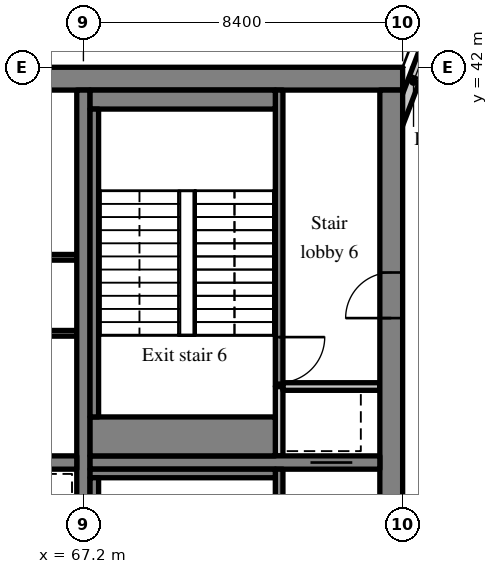
"""IFC4 building model, lengths in metres.
Left out: names, types, materials, properties, quantities, classifications, styles, units other than length and angle.
Written with IfcOpenShell. Run it as: python <this file> out.ifc"""

import sys

from ifc_helpers import new_model, si_unit, direction, frame, frame_2d, origin, place, context, subcontext, project, spatial, rectangle, extrude, source, transform, mapped, element, fill, save


model = new_model("IFC4")
c1 = context("Model", 3, precision=1e-05, world=origin(), true_north=direction((0.0, 1.0)))
c2 = subcontext(c1, "Body", "Model", "MODEL_VIEW")
j1 = project(units=[si_unit("LENGTHUNIT", "METRE"), si_unit("PLANEANGLEUNIT", "RADIAN")], contexts=[c1])
p1 = place(None, origin())
s1 = spatial("IfcSite", under=j1, at=p1, CompositionType="ELEMENT")
p2 = place(p1, origin())
s2 = spatial("IfcBuilding", under=s1, at=p2, CompositionType="ELEMENT")
p3 = place(p2, frame((0.0, 0.0, 245.2)))
s3 = spatial("IfcBuildingStorey", under=s2, at=p3, CompositionType="ELEMENT", Elevation=245.2)
m1 = source(origin(), c2, "Body", "SweptSolid", [
    extrude(rectangle(XDim=50.4, YDim=0.6, at=frame_2d((25.2, 0.0))), origin(), (0.0, 0.0, 1.0), 3.62),
])
p4 = place(p3, frame((25.2, 41.7, 0.0), z_axis=(0.0, 0.0, 1.0), x_axis=(1.0, 0.0, 0.0)))
e1 = element("IfcWall", 1, at=p4, inside=s3, PredefinedType="SHEAR", context=c2, shape_type="MappedRepresentation", body=[
    mapped(m1, transform((0.0, 0.0, 0.0), scale=1.0)),
])
m2 = source(origin(), c2, "Body", "SweptSolid", [
    extrude(rectangle(XDim=18.8, YDim=0.6, at=frame_2d((9.4, 0.0))), origin(), (0.0, 0.0, 1.0), 3.62),
])
p5 = place(p3, frame((75.3, 22.6, 0.0), z_axis=(0.0, 0.0, 1.0), x_axis=(0.0, 1.0, 0.0)))
e2 = element("IfcWall", 2, at=p5, inside=s3, PredefinedType="SHEAR", context=c2, shape_type="MappedRepresentation", body=[
    mapped(m2, transform((0.0, 0.0, 0.0), scale=1.0)),
])
m3 = source(origin(), c2, "Body", "SweptSolid", [
    extrude(rectangle(XDim=1.2, YDim=2.1, at=frame_2d((0.6, 1.05))), frame((0.0, 0.31, 0.0), z_axis=(0.0, -1.0, 0.0), x_axis=(1.0, 0.0, 0.0)), (0.0, 0.0, 1.0), 0.62),
])
p6 = place(p5, frame((12.8, 0.0, 0.0)))
e3 = element("IfcOpeningElement", 3, at=p6, cuts=e2, PredefinedType="OPENING", context=c2, shape_type="MappedRepresentation", body=[
    mapped(m3, transform((0.0, 0.0, 0.0), scale=1.0)),
])
m4 = source(origin(), c2, "Body", "SweptSolid", [
    extrude(rectangle(XDim=18.8, YDim=0.35, at=frame_2d((9.4, 0.0))), origin(), (0.0, 0.0, 1.0), 3.62),
])
p7 = place(p3, frame((67.2, 22.6, 0.0), z_axis=(0.0, 0.0, 1.0), x_axis=(0.0, 1.0, 0.0)))
e4 = element("IfcWall", 4, at=p7, inside=s3, PredefinedType="SHEAR", context=c2, shape_type="MappedRepresentation", body=[
    mapped(m4, transform((0.0, 0.0, 0.0), scale=1.0)),
])
m5 = source(origin(), c2, "Body", "SweptSolid", [
    extrude(rectangle(XDim=16.45, YDim=0.35, at=frame_2d((8.225, 0.0))), origin(), (0.0, 0.0, 1.0), 3.62),
])
p8 = place(p3, frame((50.575, 31.6, 0.0), z_axis=(0.0, 0.0, 1.0), x_axis=(1.0, 0.0, 0.0)))
e5 = element("IfcWall", 5, at=p8, inside=s3, PredefinedType="SHEAR", context=c2, shape_type="MappedRepresentation", body=[
    mapped(m5, transform((0.0, 0.0, 0.0), scale=1.0)),
])
m6 = source(origin(), c2, "Body", "SweptSolid", [
    extrude(rectangle(XDim=1.0, YDim=2.1, at=frame_2d((0.5, 1.05))), frame((0.0, 0.185, 0.0), z_axis=(0.0, -1.0, 0.0), x_axis=(1.0, 0.0, 0.0)), (0.0, 0.0, 1.0), 0.37),
])
p9 = place(p8, frame((0.613, 0.0, 0.0)))
e6 = element("IfcOpeningElement", 6, at=p9, cuts=e5, PredefinedType="OPENING", context=c2, shape_type="MappedRepresentation", body=[
    mapped(m6, transform((0.0, 0.0, 0.0), scale=1.0)),
])
m7 = source(origin(), c2, "Body", "SweptSolid", [
    extrude(rectangle(XDim=7.625, YDim=0.35, at=frame_2d((3.812, 0.0))), origin(), (0.0, 0.0, 1.0), 3.62),
])
p10 = place(p3, frame((67.375, 31.6, 0.0), z_axis=(0.0, 0.0, 1.0), x_axis=(1.0, 0.0, 0.0)))
e7 = element("IfcWall", 7, at=p10, inside=s3, PredefinedType="SHEAR", context=c2, shape_type="MappedRepresentation", body=[
    mapped(m7, transform((0.0, 0.0, 0.0), scale=1.0)),
])
m8 = source(origin(), c2, "Body", "SweptSolid", [
    extrude(rectangle(XDim=1.1, YDim=2.1, at=frame_2d((0.55, 1.05))), frame((0.0, 0.185, 0.0), z_axis=(0.0, -1.0, 0.0), x_axis=(1.0, 0.0, 0.0)), (0.0, 0.0, 1.0), 0.37),
])
p11 = place(p10, frame((5.8, 0.0, 0.0)))
e8 = element("IfcOpeningElement", 8, at=p11, cuts=e7, PredefinedType="OPENING", context=c2, shape_type="MappedRepresentation", body=[
    mapped(m8, transform((0.0, 0.0, 0.0), scale=1.0)),
])
m9 = source(origin(), c2, "Body", "SweptSolid", [
    extrude(rectangle(XDim=3.559, YDim=0.3, at=frame_2d((1.78, 0.0))), origin(), (0.0, 0.0, 1.0), 3.62),
])
p12 = place(p3, frame((76.523, 43.292, 0.0), z_axis=(0.0, 0.0, 1.0), x_axis=(-0.35779745313, -0.933799219604, 0.0)))
e9 = element("IfcWall", 9, at=p12, inside=s3, PredefinedType="SOLIDWALL", context=c2, shape_type="MappedRepresentation", body=[
    mapped(m9, transform((0.0, 0.0, 0.0), scale=1.0)),
])
m10 = source(origin(), c2, "Body", "SweptSolid", [
    extrude(rectangle(XDim=1.5, YDim=2.0, at=frame_2d((0.75, 1.0))), frame((0.0, 0.16, 0.0), z_axis=(0.0, -1.0, 0.0), x_axis=(1.0, 0.0, 0.0)), (0.0, 0.0, 1.0), 0.32),
])
p13 = place(p12, frame((0.156, 0.0, 0.9)))
e10 = element("IfcOpeningElement", 10, at=p13, cuts=e9, PredefinedType="OPENING", context=c2, shape_type="MappedRepresentation", body=[
    mapped(m10, transform((0.0, 0.0, 0.0), scale=1.0)),
])
m11 = source(origin(), c2, "Body", "SweptSolid", [
    extrude(rectangle(XDim=14.225, YDim=0.15, at=frame_2d((7.112, 0.0))), origin(), (0.0, 0.0, 1.0), 3.62),
])
p14 = place(p3, frame((67.025, 35.0, 0.0), z_axis=(0.0, 0.0, 1.0), x_axis=(-1.0, 0.0, 0.0)))
e11 = element("IfcWall", 11, at=p14, inside=s3, PredefinedType="PARTITIONING", context=c2, shape_type="MappedRepresentation", body=[
    mapped(m11, transform((0.0, 0.0, 0.0), scale=1.0)),
])
m12 = source(origin(), c2, "Body", "SweptSolid", [
    extrude(rectangle(XDim=0.9, YDim=2.1, at=frame_2d((0.45, 1.05))), frame((0.0, 0.085, 0.0), z_axis=(0.0, -1.0, 0.0), x_axis=(1.0, 0.0, 0.0)), (0.0, 0.0, 1.0), 0.17),
])
p15 = place(p14, frame((2.026, 0.0, 0.0)))
e12 = element("IfcOpeningElement", 12, at=p15, cuts=e11, PredefinedType="OPENING", context=c2, shape_type="MappedRepresentation", body=[
    mapped(m12, transform((0.0, 0.0, 0.0), scale=1.0)),
])
p16 = place(p14, frame((9.101, 0.0, 0.0)))
e13 = element("IfcOpeningElement", 13, at=p16, cuts=e11, PredefinedType="OPENING", context=c2, shape_type="MappedRepresentation", body=[
    mapped(m12, transform((0.0, 0.0, 0.0), scale=1.0)),
])
m13 = source(origin(), c2, "Body", "SweptSolid", [
    extrude(rectangle(XDim=16.45, YDim=0.15, at=frame_2d((8.225, 0.0))), origin(), (0.0, 0.0, 1.0), 3.62),
])
p17 = place(p3, frame((67.025, 37.0, 0.0), z_axis=(0.0, 0.0, 1.0), x_axis=(-1.0, 0.0, 0.0)))
e14 = element("IfcWall", 14, at=p17, inside=s3, PredefinedType="PARTITIONING", context=c2, shape_type="MappedRepresentation", body=[
    mapped(m13, transform((0.0, 0.0, 0.0), scale=1.0)),
])
p18 = place(p17, frame((1.606, 0.0, 0.0)))
e15 = element("IfcOpeningElement", 15, at=p18, cuts=e14, PredefinedType="OPENING", context=c2, shape_type="MappedRepresentation", body=[
    mapped(m12, transform((0.0, 0.0, 0.0), scale=1.0)),
])
p19 = place(p17, frame((7.364, 0.0, 0.0)))
e16 = element("IfcOpeningElement", 16, at=p19, cuts=e14, PredefinedType="OPENING", context=c2, shape_type="MappedRepresentation", body=[
    mapped(m12, transform((0.0, 0.0, 0.0), scale=1.0)),
])
p20 = place(p17, frame((12.299, 0.0, 0.0)))
e17 = element("IfcOpeningElement", 17, at=p20, cuts=e14, PredefinedType="OPENING", context=c2, shape_type="MappedRepresentation", body=[
    mapped(m12, transform((0.0, 0.0, 0.0), scale=1.0)),
])
p21 = place(p17, frame((14.766, 0.0, 0.0)))
e18 = element("IfcOpeningElement", 18, at=p21, cuts=e14, PredefinedType="OPENING", context=c2, shape_type="MappedRepresentation", body=[
    mapped(m12, transform((0.0, 0.0, 0.0), scale=1.0)),
])
m14 = source(origin(), c2, "Body", "SweptSolid", [
    extrude(rectangle(XDim=8.825, YDim=0.2, at=frame_2d((4.413, 0.0))), origin(), (0.0, 0.0, 1.0), 3.62),
])
p22 = place(p3, frame((72.35, 22.6, 0.0), z_axis=(0.0, 0.0, 1.0), x_axis=(0.0, 1.0, 0.0)))
e19 = element("IfcWall", 19, at=p22, inside=s3, PredefinedType="SOLIDWALL", context=c2, shape_type="MappedRepresentation", body=[
    mapped(m14, transform((0.0, 0.0, 0.0), scale=1.0)),
])
m15 = source(origin(), c2, "Body", "SweptSolid", [
    extrude(rectangle(XDim=1.2, YDim=2.1, at=frame_2d((0.6, 1.05))), frame((0.0, 0.11, 0.0), z_axis=(0.0, -1.0, 0.0), x_axis=(1.0, 0.0, 0.0)), (0.0, 0.0, 1.0), 0.22),
])
p23 = place(p22, frame((1.0, 0.0, 0.0)))
e20 = element("IfcOpeningElement", 20, at=p23, cuts=e19, PredefinedType="OPENING", context=c2, shape_type="MappedRepresentation", body=[
    mapped(m15, transform((0.0, 0.0, 0.0), scale=1.0)),
])
m16 = source(origin(), c2, "Body", "SweptSolid", [
    extrude(rectangle(XDim=1.825, YDim=0.2, at=frame_2d((0.913, 0.0))), origin(), (0.0, 0.0, 1.0), 3.62),
])
p24 = place(p3, frame((72.35, 31.775, 0.0), z_axis=(0.0, 0.0, 1.0), x_axis=(0.0, 1.0, 0.0)))
e21 = element("IfcWall", 21, at=p24, inside=s3, PredefinedType="SOLIDWALL", context=c2, shape_type="MappedRepresentation", body=[
    mapped(m16, transform((0.0, 0.0, 0.0), scale=1.0)),
])
m17 = source(origin(), c2, "Body", "SweptSolid", [
    extrude(rectangle(XDim=2.55, YDim=0.2, at=frame_2d((1.275, 0.0))), origin(), (0.0, 0.0, 1.0), 3.62),
])
p25 = place(p3, frame((72.45, 33.6, 0.0), z_axis=(0.0, 0.0, 1.0), x_axis=(1.0, 0.0, 0.0)))
e22 = element("IfcWall", 22, at=p25, inside=s3, PredefinedType="SOLIDWALL", context=c2, shape_type="MappedRepresentation", body=[
    mapped(m17, transform((0.0, 0.0, 0.0), scale=1.0)),
])
m18 = source(origin(), c2, "Body", "SweptSolid", [
    extrude(rectangle(XDim=7.8, YDim=0.2, at=frame_2d((3.9, 0.0))), origin(), (0.0, 0.0, 1.0), 3.62),
])
p26 = place(p3, frame((72.35, 33.6, 0.0), z_axis=(0.0, 0.0, 1.0), x_axis=(0.0, 1.0, 0.0)))
e23 = element("IfcWall", 23, at=p26, inside=s3, PredefinedType="SOLIDWALL", context=c2, shape_type="MappedRepresentation", body=[
    mapped(m18, transform((0.0, 0.0, 0.0), scale=1.0)),
])
p27 = place(p26, frame((0.1, 0.0, 0.0)))
e24 = element("IfcOpeningElement", 24, at=p27, cuts=e23, PredefinedType="OPENING", context=c2, shape_type="MappedRepresentation", body=[
    mapped(m15, transform((0.0, 0.0, 0.0), scale=1.0)),
])
m19 = source(origin(), c2, "Body", "SweptSolid", [
    extrude(rectangle(XDim=4.875, YDim=0.225, at=frame_2d((2.438, 0.0))), origin(), (0.0, 0.0, 1.0), 3.62),
])
p28 = place(p3, frame((67.375, 31.312, 0.0), z_axis=(0.0, 0.0, 1.0), x_axis=(1.0, 0.0, 0.0)))
e25 = element("IfcWall", 25, at=p28, inside=s3, PredefinedType="SOLIDWALL", context=c2, shape_type="MappedRepresentation", body=[
    mapped(m19, transform((0.0, 0.0, 0.0), scale=1.0)),
])
m20 = source(origin(), c2, "Body", "SweptSolid", [
    extrude(rectangle(XDim=8.1, YDim=0.225, at=frame_2d((4.05, 0.0))), origin(), (0.0, 0.0, 1.0), 3.62),
])
p29 = place(p3, frame((67.487, 23.1, 0.0), z_axis=(0.0, 0.0, 1.0), x_axis=(0.0, 1.0, 0.0)))
e26 = element("IfcWall", 26, at=p29, inside=s3, PredefinedType="SOLIDWALL", context=c2, shape_type="MappedRepresentation", body=[
    mapped(m20, transform((0.0, 0.0, 0.0), scale=1.0)),
])
m21 = source(origin(), c2, "Body", "SweptSolid", [
    extrude(rectangle(XDim=4.875, YDim=0.5, at=frame_2d((2.438, 0.0))), origin(), (0.0, 0.0, 1.0), 3.62),
])
p30 = place(p3, frame((67.375, 41.15, 0.0), z_axis=(0.0, 0.0, 1.0), x_axis=(1.0, 0.0, 0.0)))
e27 = element("IfcWall", 27, at=p30, inside=s3, PredefinedType="SOLIDWALL", context=c2, shape_type="MappedRepresentation", body=[
    mapped(m21, transform((0.0, 0.0, 0.0), scale=1.0)),
])
m22 = source(origin(), c2, "Body", "SweptSolid", [
    extrude(rectangle(XDim=4.875, YDim=1.025, at=frame_2d((2.438, 0.0))), origin(), (0.0, 0.0, 1.0), 3.62),
])
p31 = place(p3, frame((67.375, 32.287, 0.0), z_axis=(0.0, 0.0, 1.0), x_axis=(1.0, 0.0, 0.0)))
e28 = element("IfcWall", 28, at=p31, inside=s3, PredefinedType="SOLIDWALL", context=c2, shape_type="MappedRepresentation", body=[
    mapped(m22, transform((0.0, 0.0, 0.0), scale=1.0)),
])
p32 = place(p3, frame((67.487, 32.8, 0.0), z_axis=(0.0, 0.0, 1.0), x_axis=(0.0, 1.0, 0.0)))
e29 = element("IfcWall", 29, at=p32, inside=s3, PredefinedType="SOLIDWALL", context=c2, shape_type="MappedRepresentation", body=[
    mapped(m20, transform((0.0, 0.0, 0.0), scale=1.0)),
])
m23 = source(origin(), c2, "Body", "SweptSolid", [
    extrude(rectangle(XDim=1.5, YDim=2.0, at=frame_2d((0.75, 1.0))), frame((0.0, 0.03, 0.0), z_axis=(0.0, -1.0, 0.0), x_axis=(1.0, 0.0, 0.0)), (0.0, 0.0, 1.0), 0.06),
])
p33 = place(p13, origin())
e30 = element("IfcWindow", 30, at=p33, inside=s3, PartitioningType="SINGLE_PANEL", PredefinedType="WINDOW", context=c2, shape_type="MappedRepresentation", body=[
    mapped(m23, transform((0.0, 0.0, 0.0), scale=1.0)),
])
fill(e10, e30)
m24 = source(origin(), c2, "Body", "SweptSolid", [
    extrude(rectangle(XDim=1.1, YDim=2.1, at=frame_2d((0.55, 1.05))), frame((0.0, 0.025, 0.0), z_axis=(0.0, -1.0, 0.0), x_axis=(1.0, 0.0, 0.0)), (0.0, 0.0, 1.0), 0.05),
])
p34 = place(p11, origin())
e31 = element("IfcDoor", 31, at=p34, inside=s3, OperationType="SLIDING_TO_RIGHT", PredefinedType="DOOR", context=c2, shape_type="MappedRepresentation", body=[
    mapped(m24, transform((0.0, 0.0, 0.0), scale=1.0)),
])
fill(e8, e31)
m25 = source(origin(), c2, "Body", "SweptSolid", [
    extrude(rectangle(XDim=1.2, YDim=2.1, at=frame_2d((0.6, 1.05))), frame((0.0, 0.025, 0.0), z_axis=(0.0, -1.0, 0.0), x_axis=(1.0, 0.0, 0.0)), (0.0, 0.0, 1.0), 0.05),
])
p35 = place(p27, origin())
e32 = element("IfcDoor", 32, at=p35, inside=s3, OperationType="SINGLE_SWING_RIGHT", PredefinedType="DOOR", context=c2, shape_type="MappedRepresentation", body=[
    mapped(m25, transform((0.0, 0.0, 0.0), scale=1.0)),
])
fill(e24, e32)
p36 = place(p6, origin())
e33 = element("IfcDoor", 33, at=p36, inside=s3, OperationType="SINGLE_SWING_LEFT", PredefinedType="DOOR", context=c2, shape_type="MappedRepresentation", body=[
    mapped(m25, transform((0.0, 0.0, 0.0), scale=1.0)),
])
fill(e3, e33)
save(model, sys.argv[1])
